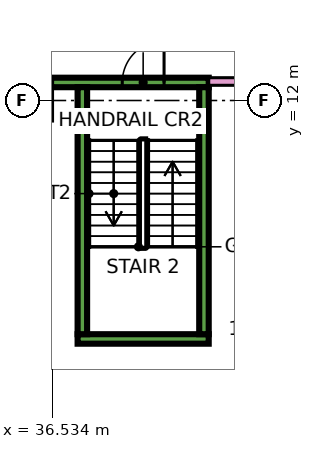
"""IFC4 building model, lengths in metres.
Left out: names, types, materials, properties, quantities, classifications, styles, units other than length and angle.
Written with IfcOpenShell. Run it as: python <this file> out.ifc"""

import sys

from ifc_helpers import new_model, si_unit, direction, frame, frame_2d, origin, place, context, subcontext, project, spatial, rectangle, extrude, element, fill, save


model = new_model("IFC4")
c1 = context("Model", 3, precision=1e-05, world=origin(), true_north=direction((0.0, 1.0)))
c2 = subcontext(c1, "Body", "Model", "MODEL_VIEW")
j1 = project(units=[si_unit("LENGTHUNIT", "METRE"), si_unit("PLANEANGLEUNIT", "RADIAN")], contexts=[c1])
p1 = place(None, origin())
s1 = spatial("IfcSite", under=j1, at=p1, CompositionType="ELEMENT")
p2 = place(p1, origin())
s2 = spatial("IfcBuilding", under=s1, at=p2, CompositionType="ELEMENT")
p3 = place(p2, frame((0.0, 0.0, 95.65)))
s3 = spatial("IfcBuildingStorey", under=s2, at=p3, CompositionType="ELEMENT", Elevation=95.65)
p4 = place(p3, frame((37.2, 5.725, 0.0), z_axis=(0.0, 0.0, 1.0), x_axis=(1.0, 0.0, 0.0)))
e1 = element("IfcWall", 1, at=p4, inside=s3, PredefinedType="SHEAR", context=c2, shape_type="SweptSolid", body=[
    extrude(rectangle(XDim=3.45, YDim=0.25, at=frame_2d((1.725, 0.0))), origin(), (0.0, 0.0, 1.0), 3.75),
])
p5 = place(p3, frame((36.5, 12.475, 0.0), z_axis=(0.0, 0.0, 1.0), x_axis=(1.0, 0.0, 0.0)))
e2 = element("IfcWall", 2, at=p5, inside=s3, PredefinedType="SHEAR", context=c2, shape_type="SweptSolid", body=[
    extrude(rectangle(XDim=4.15, YDim=0.25, at=frame_2d((2.075, 0.0))), origin(), (0.0, 0.0, 1.0), 3.75),
])
p6 = place(p5, frame((1.875, 0.0, 0.0)))
e3 = element("IfcOpeningElement", 3, at=p6, cuts=e2, PredefinedType="OPENING", context=c2, shape_type="SweptSolid", body=[
    extrude(rectangle(XDim=1.1, YDim=2.2, at=frame_2d((0.55, 1.1))), frame((0.0, 0.135, 0.0), z_axis=(0.0, -1.0, 0.0), x_axis=(1.0, 0.0, 0.0)), (0.0, 0.0, 1.0), 0.27),
])
for number, where, z_axis, x_axis in (
    (4, (37.325, 5.85, 0.0), (0.0, 0.0, 1.0), (0.0, 1.0, 0.0)),
    (5, (40.525, 5.85, 0.0), (0.0, 0.0, 1.0), (0.0, 1.0, 0.0)),
):
    element("IfcWall", number, at=place(p3, frame(where, z_axis=z_axis, x_axis=x_axis)), inside=s3, PredefinedType="SHEAR", context=c2, shape_type="SweptSolid", body=[
        extrude(rectangle(XDim=6.5, YDim=0.25, at=frame_2d((3.25, 0.0))), origin(), (0.0, 0.0, 1.0), 3.75),
    ])
p7 = place(p3, frame((40.65, 12.5, 0.0), z_axis=(0.0, 0.0, 1.0), x_axis=(1.0, 0.0, 0.0)))
e6 = element("IfcWall", 6, at=p7, inside=s3, PredefinedType="PARTITIONING", context=c2, shape_type="SweptSolid", body=[
    extrude(rectangle(XDim=24.825, YDim=0.2, at=frame_2d((12.413, 0.0))), origin(), (0.0, 0.0, 1.0), 3.35),
])
p8 = place(p7, frame((8.4, 0.0, 0.0)))
e7 = element("IfcOpeningElement", 7, at=p8, cuts=e6, PredefinedType="OPENING", context=c2, shape_type="SweptSolid", body=[
    extrude(rectangle(XDim=1.0, YDim=2.1, at=frame_2d((0.5, 1.05))), frame((0.0, 0.11, 0.0), z_axis=(0.0, -1.0, 0.0), x_axis=(1.0, 0.0, 0.0)), (0.0, 0.0, 1.0), 0.22),
])
p9 = place(p7, frame((1.05, 0.0, 0.0)))
e8 = element("IfcOpeningElement", 8, at=p9, cuts=e6, PredefinedType="OPENING", context=c2, shape_type="SweptSolid", body=[
    extrude(rectangle(XDim=1.0, YDim=2.1, at=frame_2d((0.5, 1.05))), frame((0.0, 0.11, 0.0), z_axis=(0.0, -1.0, 0.0), x_axis=(1.0, 0.0, 0.0)), (0.0, 0.0, 1.0), 0.22),
])
p10 = place(p6, frame((1.1, 0.0, 0.0), z_axis=(0.0, 0.0, 1.0), x_axis=(-1.0, 0.0, 0.0)))
e9 = element("IfcDoor", 9, at=p10, inside=s3, OperationType="SINGLE_SWING_RIGHT", PredefinedType="DOOR", context=c2, shape_type="SweptSolid", body=[
    extrude(rectangle(XDim=1.1, YDim=2.2, at=frame_2d((0.55, 1.1))), frame((0.0, 0.025, 0.0), z_axis=(0.0, -1.0, 0.0), x_axis=(1.0, 0.0, 0.0)), (0.0, 0.0, 1.0), 0.05),
])
fill(e3, e9)
save(model, sys.argv[1])
